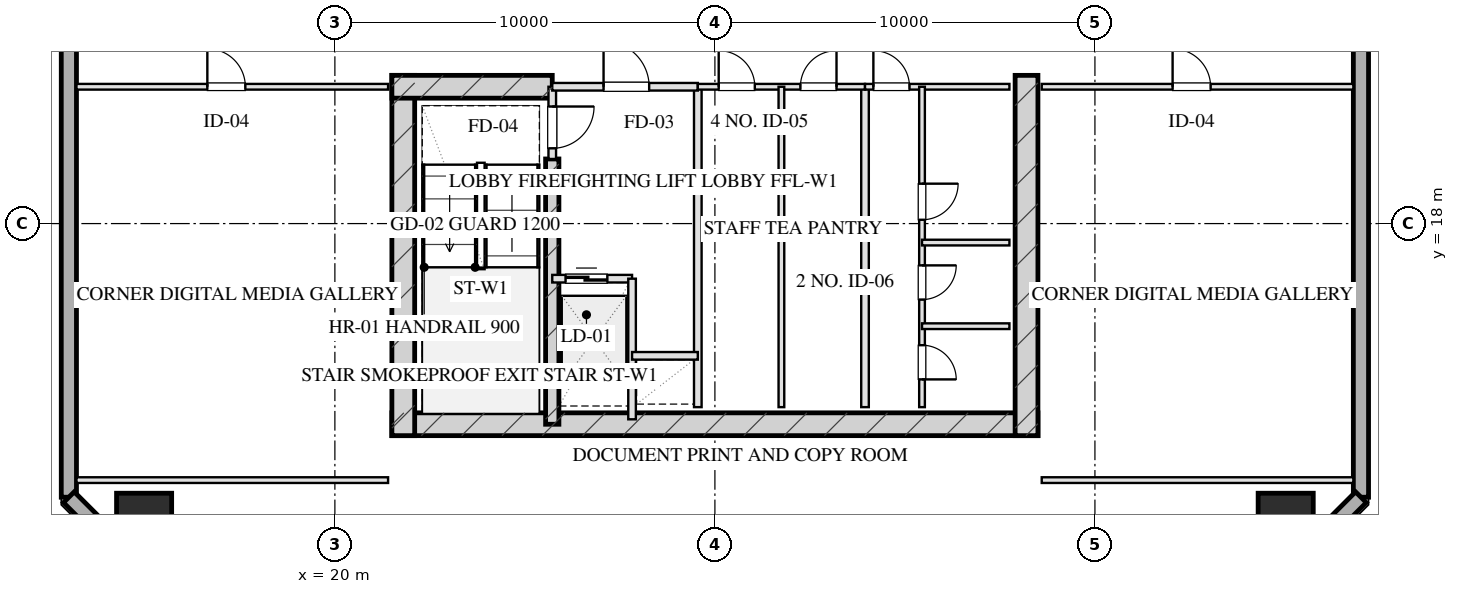
"""IFC4 building model, lengths in metres.
Left out: names, types, materials, properties, quantities, classifications, styles, units other than length and angle.
Written with IfcOpenShell. Run it as: python <this file> out.ifc"""

import sys

from ifc_helpers import new_model, si_unit, direction, frame, frame_2d, origin, origin_2d, place, context, subcontext, project, spatial, rectangle, hollow_rectangle, extrude, element, fill, save


model = new_model("IFC4")
c1 = context("Model", 3, precision=1e-05, world=origin(), true_north=direction((0.0, 1.0)))
c2 = subcontext(c1, "Body", "Model", "MODEL_VIEW")
j1 = project(units=[si_unit("LENGTHUNIT", "METRE"), si_unit("PLANEANGLEUNIT", "RADIAN")], contexts=[c1])
p1 = place(None, origin())
s1 = spatial("IfcSite", under=j1, at=p1, CompositionType="ELEMENT")
p2 = place(p1, origin())
s2 = spatial("IfcBuilding", under=s1, at=p2, CompositionType="ELEMENT")
p3 = place(p2, frame((0.0, 0.0, 177.1)))
s3 = spatial("IfcBuildingStorey", under=s2, at=p3, CompositionType="ELEMENT", Elevation=177.1)
p4 = place(p3, frame((21.5, 12.72, 0.0), z_axis=(0.0, 0.0, 1.0), x_axis=(1.0, 0.0, 0.0)))
e1 = element("IfcWall", 1, at=p4, inside=s3, PredefinedType="SHEAR", context=c2, shape_type="SweptSolid", body=[
    extrude(rectangle(XDim=17.0, YDim=0.6, at=frame_2d((8.5, 0.0))), origin(), (0.0, 0.0, 1.0), 3.45),
])
for number, where, z_axis, x_axis in (
    (2, (21.8, 21.9, 0.0), (0.0, 0.0, 1.0), (0.0, -1.0, 0.0)),
    (3, (38.2, 21.9, 0.0), (0.0, 0.0, 1.0), (0.0, -1.0, 0.0)),
):
    element("IfcWall", number, at=place(p3, frame(where, z_axis=z_axis, x_axis=x_axis)), inside=s3, PredefinedType="SHEAR", context=c2, shape_type="SweptSolid", body=[
        extrude(rectangle(XDim=9.48, YDim=0.6, at=frame_2d((4.74, 0.0))), origin(), (0.0, 0.0, 1.0), 3.45),
    ])
p5 = place(p3, frame((25.72, 19.7, 0.0), z_axis=(0.0, 0.0, 1.0), x_axis=(0.0, -1.0, 0.0)))
e4 = element("IfcWall", 4, at=p5, inside=s3, PredefinedType="SHEAR", context=c2, shape_type="SweptSolid", body=[
    extrude(rectangle(XDim=6.98, YDim=0.35, at=frame_2d((3.49, 0.0))), origin(), (0.0, 0.0, 1.0), 3.45),
])
p6 = place(p3, frame((21.5, 21.6, 0.0), z_axis=(0.0, 0.0, 1.0), x_axis=(1.0, 0.0, 0.0)))
e5 = element("IfcWall", 5, at=p6, inside=s3, PredefinedType="SHEAR", context=c2, shape_type="SweptSolid", body=[
    extrude(rectangle(XDim=4.22, YDim=0.6, at=frame_2d((2.11, 0.0))), origin(), (0.0, 0.0, 1.0), 3.45),
])
for number, where, z_axis, x_axis in (
    (6, (14.98, 10.18, 0.0), (0.0, 0.0, 1.0), (1.0, 0.0, 0.0)),
    (7, (45.02, 10.18, 0.0), (0.0, 0.0, 1.0), (1.0, 0.0, 0.0)),
):
    element("IfcColumn", number, at=place(p3, frame(where, z_axis=z_axis, x_axis=x_axis)), inside=s3, PredefinedType="COLUMN", context=c2, shape_type="SweptSolid", body=[
        extrude(hollow_rectangle(XDim=1.45, YDim=1.45, WallThickness=0.05, at=origin_2d()), origin(), (0.0, 0.0, 1.0), 3.451),
    ])
p7 = place(p3, frame((13.0, 10.8, 0.0), z_axis=(0.0, 0.0, 1.0), x_axis=(0.0, 1.0, 0.0)))
e8 = element("IfcWall", 8, at=p7, inside=s3, PredefinedType="SOLIDWALL", context=c2, shape_type="SweptSolid", body=[
    extrude(rectangle(XDim=46.4, YDim=0.4, at=frame_2d((23.2, 0.0))), origin(), (0.0, 0.0, 1.0), 2.61),
])
p8 = place(p7, frame((15.75, 0.0, 0.75)))
e9 = element("IfcOpeningElement", 9, at=p8, cuts=e8, PredefinedType="OPENING", context=c2, shape_type="SweptSolid", body=[
    extrude(rectangle(XDim=2.1, YDim=1.46, at=frame_2d((1.05, 0.73))), frame((0.0, 0.21, 0.0), z_axis=(0.0, -1.0, 0.0), x_axis=(1.0, 0.0, 0.0)), (0.0, 0.0, 1.0), 0.42),
])
p9 = place(p7, frame((19.55, 0.0, 0.75)))
e10 = element("IfcOpeningElement", 10, at=p9, cuts=e8, PredefinedType="OPENING", context=c2, shape_type="SweptSolid", body=[
    extrude(rectangle(XDim=2.1, YDim=1.46, at=frame_2d((1.05, 0.73))), frame((0.0, 0.21, 0.0), z_axis=(0.0, -1.0, 0.0), x_axis=(1.0, 0.0, 0.0)), (0.0, 0.0, 1.0), 0.42),
])
p10 = place(p7, frame((28.45, 0.0, 0.0)))
e11 = element("IfcOpeningElement", 11, at=p10, cuts=e8, PredefinedType="OPENING", context=c2, shape_type="SweptSolid", body=[
    extrude(rectangle(XDim=1.1, YDim=2.15, at=frame_2d((0.55, 1.075))), frame((0.0, 0.21, 0.0), z_axis=(0.0, -1.0, 0.0), x_axis=(1.0, 0.0, 0.0)), (0.0, 0.0, 1.0), 0.42),
])
p11 = place(p3, frame((47.0, 57.2, 0.0), z_axis=(0.0, 0.0, 1.0), x_axis=(0.0, -1.0, 0.0)))
e12 = element("IfcWall", 12, at=p11, inside=s3, PredefinedType="SOLIDWALL", context=c2, shape_type="SweptSolid", body=[
    extrude(rectangle(XDim=46.4, YDim=0.4, at=frame_2d((23.2, 0.0))), origin(), (0.0, 0.0, 1.0), 2.61),
])
p12 = place(p11, frame((28.55, 0.0, 0.75)))
e13 = element("IfcOpeningElement", 13, at=p12, cuts=e12, PredefinedType="OPENING", context=c2, shape_type="SweptSolid", body=[
    extrude(rectangle(XDim=2.1, YDim=1.46, at=frame_2d((1.05, 0.73))), frame((0.0, 0.21, 0.0), z_axis=(0.0, -1.0, 0.0), x_axis=(1.0, 0.0, 0.0)), (0.0, 0.0, 1.0), 0.42),
])
p13 = place(p11, frame((24.75, 0.0, 0.75)))
e14 = element("IfcOpeningElement", 14, at=p13, cuts=e12, PredefinedType="OPENING", context=c2, shape_type="SweptSolid", body=[
    extrude(rectangle(XDim=2.1, YDim=1.46, at=frame_2d((1.05, 0.73))), frame((0.0, 0.21, 0.0), z_axis=(0.0, -1.0, 0.0), x_axis=(1.0, 0.0, 0.0)), (0.0, 0.0, 1.0), 0.42),
])
p14 = place(p11, frame((18.25, 0.0, 0.0)))
e15 = element("IfcOpeningElement", 15, at=p14, cuts=e12, PredefinedType="OPENING", context=c2, shape_type="SweptSolid", body=[
    extrude(rectangle(XDim=1.1, YDim=2.15, at=frame_2d((0.55, 1.075))), frame((0.0, 0.21, 0.0), z_axis=(0.0, -1.0, 0.0), x_axis=(1.0, 0.0, 0.0)), (0.0, 0.0, 1.0), 0.42),
])
for number, where, z_axis, x_axis in (
    (16, (47.0, 10.8, 0.0), (0.0, 0.0, 1.0), (-0.707, -0.707, 0.0)),
    (17, (15.6, 8.2, 0.0), (0.0, 0.0, 1.0), (-0.707, 0.707, 0.0)),
):
    element("IfcWall", number, at=place(p3, frame(where, z_axis=z_axis, x_axis=x_axis)), inside=s3, PredefinedType="SOLIDWALL", context=c2, shape_type="SweptSolid", body=[
        extrude(rectangle(XDim=3.677, YDim=0.4, at=frame_2d((1.838, 0.0))), origin(), (0.0, 0.0, 1.0), 2.61),
    ])
p15 = place(p3, frame((25.72, 21.6, 0.0), z_axis=(0.0, 0.0, 1.0), x_axis=(0.0, -1.0, 0.0)))
e18 = element("IfcWall", 18, at=p15, inside=s3, PredefinedType="PARTITIONING", context=c2, shape_type="SweptSolid", body=[
    extrude(rectangle(XDim=1.9, YDim=0.2, at=frame_2d((0.95, 0.0))), origin(), (0.0, 0.0, 1.0), 3.175),
])
p16 = place(p15, frame((0.52, 0.0, 0.0)))
e19 = element("IfcOpeningElement", 19, at=p16, cuts=e18, PredefinedType="OPENING", context=c2, shape_type="SweptSolid", body=[
    extrude(rectangle(XDim=1.1, YDim=2.05, at=frame_2d((0.55, 1.025))), frame((0.0, 0.11, 0.0), z_axis=(0.0, -1.0, 0.0), x_axis=(1.0, 0.0, 0.0)), (0.0, 0.0, 1.0), 0.22),
])
p17 = place(p3, frame((29.55, 21.6, 0.0), z_axis=(0.0, 0.0, 1.0), x_axis=(0.0, -1.0, 0.0)))
e20 = element("IfcWall", 20, at=p17, inside=s3, PredefinedType="PARTITIONING", context=c2, shape_type="SweptSolid", body=[
    extrude(rectangle(XDim=8.43, YDim=0.2, at=frame_2d((4.215, 0.0))), origin(), (0.0, 0.0, 1.0), 3.175),
])
p18 = place(p3, frame((25.72, 21.6, 0.0), z_axis=(0.0, 0.0, 1.0), x_axis=(1.0, 0.0, 0.0)))
e21 = element("IfcWall", 21, at=p18, inside=s3, PredefinedType="PARTITIONING", context=c2, shape_type="SweptSolid", body=[
    extrude(rectangle(XDim=3.83, YDim=0.2, at=frame_2d((1.915, 0.0))), origin(), (0.0, 0.0, 1.0), 3.175),
])
p19 = place(p18, frame((1.35, 0.0, 0.0)))
e22 = element("IfcOpeningElement", 22, at=p19, cuts=e21, PredefinedType="OPENING", context=c2, shape_type="SweptSolid", body=[
    extrude(rectangle(XDim=1.2, YDim=2.05, at=frame_2d((0.6, 1.025))), frame((0.0, 0.11, 0.0), z_axis=(0.0, -1.0, 0.0), x_axis=(1.0, 0.0, 0.0)), (0.0, 0.0, 1.0), 0.22),
])
p20 = place(p3, frame((25.72, 16.55, 0.0), z_axis=(0.0, 0.0, 1.0), x_axis=(1.0, 0.0, 0.0)))
e23 = element("IfcWall", 23, at=p20, inside=s3, PredefinedType="PARTITIONING", context=c2, shape_type="SweptSolid", body=[
    extrude(rectangle(XDim=2.1, YDim=0.2, at=frame_2d((1.05, 0.0))), origin(), (0.0, 0.0, 1.0), 3.175),
])
p21 = place(p20, frame((0.35, 0.0, 0.0)))
e24 = element("IfcOpeningElement", 24, at=p21, cuts=e23, PredefinedType="OPENING", context=c2, shape_type="SweptSolid", body=[
    extrude(rectangle(XDim=1.1, YDim=2.05, at=frame_2d((0.55, 1.025))), frame((0.0, 0.11, 0.0), z_axis=(0.0, -1.0, 0.0), x_axis=(1.0, 0.0, 0.0)), (0.0, 0.0, 1.0), 0.22),
])
p22 = place(p3, frame((27.82, 16.55, 0.0), z_axis=(0.0, 0.0, 1.0), x_axis=(0.0, -1.0, 0.0)))
e25 = element("IfcWall", 25, at=p22, inside=s3, PredefinedType="PARTITIONING", context=c2, shape_type="SweptSolid", body=[
    extrude(rectangle(XDim=3.7, YDim=0.2, at=frame_2d((1.85, 0.0))), origin(), (0.0, 0.0, 1.0), 3.175),
])
p23 = place(p3, frame((27.82, 14.52, 0.0), z_axis=(0.0, 0.0, 1.0), x_axis=(1.0, 0.0, 0.0)))
e26 = element("IfcWall", 26, at=p23, inside=s3, PredefinedType="PARTITIONING", context=c2, shape_type="SweptSolid", body=[
    extrude(rectangle(XDim=1.73, YDim=0.2, at=frame_2d((0.865, 0.0))), origin(), (0.0, 0.0, 1.0), 3.175),
])
p24 = place(p3, frame((33.95, 21.6, 0.0), z_axis=(0.0, 0.0, 1.0), x_axis=(0.0, -1.0, 0.0)))
e27 = element("IfcWall", 27, at=p24, inside=s3, PredefinedType="PARTITIONING", context=c2, shape_type="SweptSolid", body=[
    extrude(rectangle(XDim=8.43, YDim=0.2, at=frame_2d((4.215, 0.0))), origin(), (0.0, 0.0, 1.0), 3.175),
])
p25 = place(p3, frame((29.55, 21.6, 0.0), z_axis=(0.0, 0.0, 1.0), x_axis=(1.0, 0.0, 0.0)))
e28 = element("IfcWall", 28, at=p25, inside=s3, PredefinedType="PARTITIONING", context=c2, shape_type="SweptSolid", body=[
    extrude(rectangle(XDim=4.4, YDim=0.15, at=frame_2d((2.2, 0.0))), origin(), (0.0, 0.0, 1.0), 3.175),
])
p26 = place(p25, frame((0.55, 0.0, 0.0)))
e29 = element("IfcOpeningElement", 29, at=p26, cuts=e28, PredefinedType="OPENING", context=c2, shape_type="SweptSolid", body=[
    extrude(rectangle(XDim=0.95, YDim=2.05, at=frame_2d((0.475, 1.025))), frame((0.0, 0.085, 0.0), z_axis=(0.0, -1.0, 0.0), x_axis=(1.0, 0.0, 0.0)), (0.0, 0.0, 1.0), 0.17),
])
p27 = place(p25, frame((2.7, 0.0, 0.0)))
e30 = element("IfcOpeningElement", 30, at=p27, cuts=e28, PredefinedType="OPENING", context=c2, shape_type="SweptSolid", body=[
    extrude(rectangle(XDim=0.95, YDim=2.05, at=frame_2d((0.475, 1.025))), frame((0.0, 0.085, 0.0), z_axis=(0.0, -1.0, 0.0), x_axis=(1.0, 0.0, 0.0)), (0.0, 0.0, 1.0), 0.17),
])
p28 = place(p3, frame((31.75, 21.6, 0.0), z_axis=(0.0, 0.0, 1.0), x_axis=(0.0, -1.0, 0.0)))
e31 = element("IfcWall", 31, at=p28, inside=s3, PredefinedType="PARTITIONING", context=c2, shape_type="SweptSolid", body=[
    extrude(rectangle(XDim=8.43, YDim=0.15, at=frame_2d((4.215, 0.0))), origin(), (0.0, 0.0, 1.0), 3.175),
])
p29 = place(p3, frame((33.95, 21.6, 0.0), z_axis=(0.0, 0.0, 1.0), x_axis=(1.0, 0.0, 0.0)))
e32 = element("IfcWall", 32, at=p29, inside=s3, PredefinedType="PARTITIONING", context=c2, shape_type="SweptSolid", body=[
    extrude(rectangle(XDim=3.8, YDim=0.15, at=frame_2d((1.9, 0.0))), origin(), (0.0, 0.0, 1.0), 3.175),
])
p30 = place(p29, frame((0.22, 0.0, 0.0)))
e33 = element("IfcOpeningElement", 33, at=p30, cuts=e32, PredefinedType="OPENING", context=c2, shape_type="SweptSolid", body=[
    extrude(rectangle(XDim=0.95, YDim=2.05, at=frame_2d((0.475, 1.025))), frame((0.0, 0.085, 0.0), z_axis=(0.0, -1.0, 0.0), x_axis=(1.0, 0.0, 0.0)), (0.0, 0.0, 1.0), 0.17),
])
p31 = place(p3, frame((35.45, 21.6, 0.0), z_axis=(0.0, 0.0, 1.0), x_axis=(0.0, -1.0, 0.0)))
e34 = element("IfcWall", 34, at=p31, inside=s3, PredefinedType="PARTITIONING", context=c2, shape_type="SweptSolid", body=[
    extrude(rectangle(XDim=8.43, YDim=0.15, at=frame_2d((4.215, 0.0))), origin(), (0.0, 0.0, 1.0), 2.815),
])
p32 = place(p31, frame((2.55, 0.0, 0.0)))
e35 = element("IfcOpeningElement", 35, at=p32, cuts=e34, PredefinedType="OPENING", context=c2, shape_type="SweptSolid", body=[
    extrude(rectangle(XDim=0.95, YDim=2.05, at=frame_2d((0.475, 1.025))), frame((0.0, 0.085, 0.0), z_axis=(0.0, -1.0, 0.0), x_axis=(1.0, 0.0, 0.0)), (0.0, 0.0, 1.0), 0.17),
])
p33 = place(p31, frame((4.7, 0.0, 0.0)))
e36 = element("IfcOpeningElement", 36, at=p33, cuts=e34, PredefinedType="OPENING", context=c2, shape_type="SweptSolid", body=[
    extrude(rectangle(XDim=0.9, YDim=2.05, at=frame_2d((0.45, 1.025))), frame((0.0, 0.085, 0.0), z_axis=(0.0, -1.0, 0.0), x_axis=(1.0, 0.0, 0.0)), (0.0, 0.0, 1.0), 0.17),
])
p34 = place(p31, frame((6.8, 0.0, 0.0)))
e37 = element("IfcOpeningElement", 37, at=p34, cuts=e34, PredefinedType="OPENING", context=c2, shape_type="SweptSolid", body=[
    extrude(rectangle(XDim=0.9, YDim=2.05, at=frame_2d((0.45, 1.025))), frame((0.0, 0.085, 0.0), z_axis=(0.0, -1.0, 0.0), x_axis=(1.0, 0.0, 0.0)), (0.0, 0.0, 1.0), 0.17),
])
for number, where, z_axis, x_axis in (
    (38, (35.45, 17.5, 0.0), (0.0, 0.0, 1.0), (1.0, 0.0, 0.0)),
    (39, (35.45, 15.3, 0.0), (0.0, 0.0, 1.0), (1.0, 0.0, 0.0)),
):
    element("IfcWall", number, at=place(p3, frame(where, z_axis=z_axis, x_axis=x_axis)), inside=s3, PredefinedType="PARTITIONING", context=c2, shape_type="SweptSolid", body=[
        extrude(rectangle(XDim=2.3, YDim=0.15, at=frame_2d((1.15, 0.0))), origin(), (0.0, 0.0, 1.0), 3.175),
    ])
p35 = place(p3, frame((13.2, 11.25, 0.0), z_axis=(0.0, 0.0, 1.0), x_axis=(1.0, 0.0, 0.0)))
e40 = element("IfcWall", 40, at=p35, inside=s3, PredefinedType="PARTITIONING", context=c2, shape_type="SweptSolid", body=[
    extrude(rectangle(XDim=8.2, YDim=0.15, at=frame_2d((4.1, 0.0))), origin(), (0.0, 0.0, 1.0), 3.175),
])
p36 = place(p3, frame((13.2, 21.6, 0.0), z_axis=(0.0, 0.0, 1.0), x_axis=(1.0, 0.0, 0.0)))
e41 = element("IfcWall", 41, at=p36, inside=s3, PredefinedType="PARTITIONING", context=c2, shape_type="SweptSolid", body=[
    extrude(rectangle(XDim=8.2, YDim=0.15, at=frame_2d((4.1, 0.0))), origin(), (0.0, 0.0, 1.0), 3.175),
])
p37 = place(p36, frame((3.444, 0.0, 0.0)))
e42 = element("IfcOpeningElement", 42, at=p37, cuts=e41, PredefinedType="OPENING", context=c2, shape_type="SweptSolid", body=[
    extrude(rectangle(XDim=1.0, YDim=2.05, at=frame_2d((0.5, 1.025))), frame((0.0, 0.085, 0.0), z_axis=(0.0, -1.0, 0.0), x_axis=(1.0, 0.0, 0.0)), (0.0, 0.0, 1.0), 0.17),
])
p38 = place(p3, frame((38.6, 11.25, 0.0), z_axis=(0.0, 0.0, 1.0), x_axis=(1.0, 0.0, 0.0)))
e43 = element("IfcWall", 43, at=p38, inside=s3, PredefinedType="PARTITIONING", context=c2, shape_type="SweptSolid", body=[
    extrude(rectangle(XDim=8.2, YDim=0.15, at=frame_2d((4.1, 0.0))), origin(), (0.0, 0.0, 1.0), 3.175),
])
p39 = place(p3, frame((38.6, 21.6, 0.0), z_axis=(0.0, 0.0, 1.0), x_axis=(1.0, 0.0, 0.0)))
e44 = element("IfcWall", 44, at=p39, inside=s3, PredefinedType="PARTITIONING", context=c2, shape_type="SweptSolid", body=[
    extrude(rectangle(XDim=8.2, YDim=0.15, at=frame_2d((4.1, 0.0))), origin(), (0.0, 0.0, 1.0), 3.175),
])
p40 = place(p39, frame((3.444, 0.0, 0.0)))
e45 = element("IfcOpeningElement", 45, at=p40, cuts=e44, PredefinedType="OPENING", context=c2, shape_type="SweptSolid", body=[
    extrude(rectangle(XDim=1.0, YDim=2.05, at=frame_2d((0.5, 1.025))), frame((0.0, 0.085, 0.0), z_axis=(0.0, -1.0, 0.0), x_axis=(1.0, 0.0, 0.0)), (0.0, 0.0, 1.0), 0.17),
])
p41 = place(p16, origin())
e46 = element("IfcDoor", 46, at=p41, inside=s3, OperationType="SINGLE_SWING_LEFT", PredefinedType="DOOR", context=c2, shape_type="SweptSolid", body=[
    extrude(rectangle(XDim=1.1, YDim=2.05, at=frame_2d((0.55, 1.025))), frame((0.0, 0.025, 0.0), z_axis=(0.0, -1.0, 0.0), x_axis=(1.0, 0.0, 0.0)), (0.0, 0.0, 1.0), 0.05),
])
fill(e19, e46)
p42 = place(p19, origin())
e47 = element("IfcDoor", 47, at=p42, inside=s3, OperationType="SINGLE_SWING_LEFT", PredefinedType="DOOR", context=c2, shape_type="SweptSolid", body=[
    extrude(rectangle(XDim=1.2, YDim=2.05, at=frame_2d((0.6, 1.025))), frame((0.0, 0.025, 0.0), z_axis=(0.0, -1.0, 0.0), x_axis=(1.0, 0.0, 0.0)), (0.0, 0.0, 1.0), 0.05),
])
fill(e22, e47)
p43 = place(p21, origin())
e48 = element("IfcDoor", 48, at=p43, inside=s3, OperationType="DOUBLE_DOOR_SLIDING", PredefinedType="DOOR", context=c2, shape_type="SweptSolid", body=[
    extrude(rectangle(XDim=1.1, YDim=2.05, at=frame_2d((0.55, 1.025))), frame((0.0, 0.025, 0.0), z_axis=(0.0, -1.0, 0.0), x_axis=(1.0, 0.0, 0.0)), (0.0, 0.0, 1.0), 0.05),
])
fill(e24, e48)
p44 = place(p26, origin())
e49 = element("IfcDoor", 49, at=p44, inside=s3, OperationType="SINGLE_SWING_LEFT", PredefinedType="DOOR", context=c2, shape_type="SweptSolid", body=[
    extrude(rectangle(XDim=0.95, YDim=2.05, at=frame_2d((0.475, 1.025))), frame((0.0, 0.025, 0.0), z_axis=(0.0, -1.0, 0.0), x_axis=(1.0, 0.0, 0.0)), (0.0, 0.0, 1.0), 0.05),
])
fill(e29, e49)
p45 = place(p27, origin())
e50 = element("IfcDoor", 50, at=p45, inside=s3, OperationType="SINGLE_SWING_RIGHT", PredefinedType="DOOR", context=c2, shape_type="SweptSolid", body=[
    extrude(rectangle(XDim=0.95, YDim=2.05, at=frame_2d((0.475, 1.025))), frame((0.0, 0.025, 0.0), z_axis=(0.0, -1.0, 0.0), x_axis=(1.0, 0.0, 0.0)), (0.0, 0.0, 1.0), 0.05),
])
fill(e30, e50)
p46 = place(p30, origin())
e51 = element("IfcDoor", 51, at=p46, inside=s3, OperationType="SINGLE_SWING_LEFT", PredefinedType="DOOR", context=c2, shape_type="SweptSolid", body=[
    extrude(rectangle(XDim=0.95, YDim=2.05, at=frame_2d((0.475, 1.025))), frame((0.0, 0.025, 0.0), z_axis=(0.0, -1.0, 0.0), x_axis=(1.0, 0.0, 0.0)), (0.0, 0.0, 1.0), 0.05),
])
fill(e33, e51)
p47 = place(p32, origin())
e52 = element("IfcDoor", 52, at=p47, inside=s3, OperationType="SINGLE_SWING_LEFT", PredefinedType="DOOR", context=c2, shape_type="SweptSolid", body=[
    extrude(rectangle(XDim=0.95, YDim=2.05, at=frame_2d((0.475, 1.025))), frame((0.0, 0.025, 0.0), z_axis=(0.0, -1.0, 0.0), x_axis=(1.0, 0.0, 0.0)), (0.0, 0.0, 1.0), 0.05),
])
fill(e35, e52)
p48 = place(p33, origin())
e53 = element("IfcDoor", 53, at=p48, inside=s3, OperationType="SINGLE_SWING_LEFT", PredefinedType="DOOR", context=c2, shape_type="SweptSolid", body=[
    extrude(rectangle(XDim=0.9, YDim=2.05, at=frame_2d((0.45, 1.025))), frame((0.0, 0.025, 0.0), z_axis=(0.0, -1.0, 0.0), x_axis=(1.0, 0.0, 0.0)), (0.0, 0.0, 1.0), 0.05),
])
fill(e36, e53)
p49 = place(p34, origin())
e54 = element("IfcDoor", 54, at=p49, inside=s3, OperationType="SINGLE_SWING_RIGHT", PredefinedType="DOOR", context=c2, shape_type="SweptSolid", body=[
    extrude(rectangle(XDim=0.9, YDim=2.05, at=frame_2d((0.45, 1.025))), frame((0.0, 0.025, 0.0), z_axis=(0.0, -1.0, 0.0), x_axis=(1.0, 0.0, 0.0)), (0.0, 0.0, 1.0), 0.05),
])
fill(e37, e54)
p50 = place(p37, origin())
e55 = element("IfcDoor", 55, at=p50, inside=s3, OperationType="SINGLE_SWING_LEFT", PredefinedType="DOOR", context=c2, shape_type="SweptSolid", body=[
    extrude(rectangle(XDim=1.0, YDim=2.05, at=frame_2d((0.5, 1.025))), frame((0.0, 0.025, 0.0), z_axis=(0.0, -1.0, 0.0), x_axis=(1.0, 0.0, 0.0)), (0.0, 0.0, 1.0), 0.05),
])
fill(e42, e55)
p51 = place(p40, origin())
e56 = element("IfcDoor", 56, at=p51, inside=s3, OperationType="SINGLE_SWING_LEFT", PredefinedType="DOOR", context=c2, shape_type="SweptSolid", body=[
    extrude(rectangle(XDim=1.0, YDim=2.05, at=frame_2d((0.5, 1.025))), frame((0.0, 0.025, 0.0), z_axis=(0.0, -1.0, 0.0), x_axis=(1.0, 0.0, 0.0)), (0.0, 0.0, 1.0), 0.05),
])
fill(e45, e56)
save(model, sys.argv[1])
